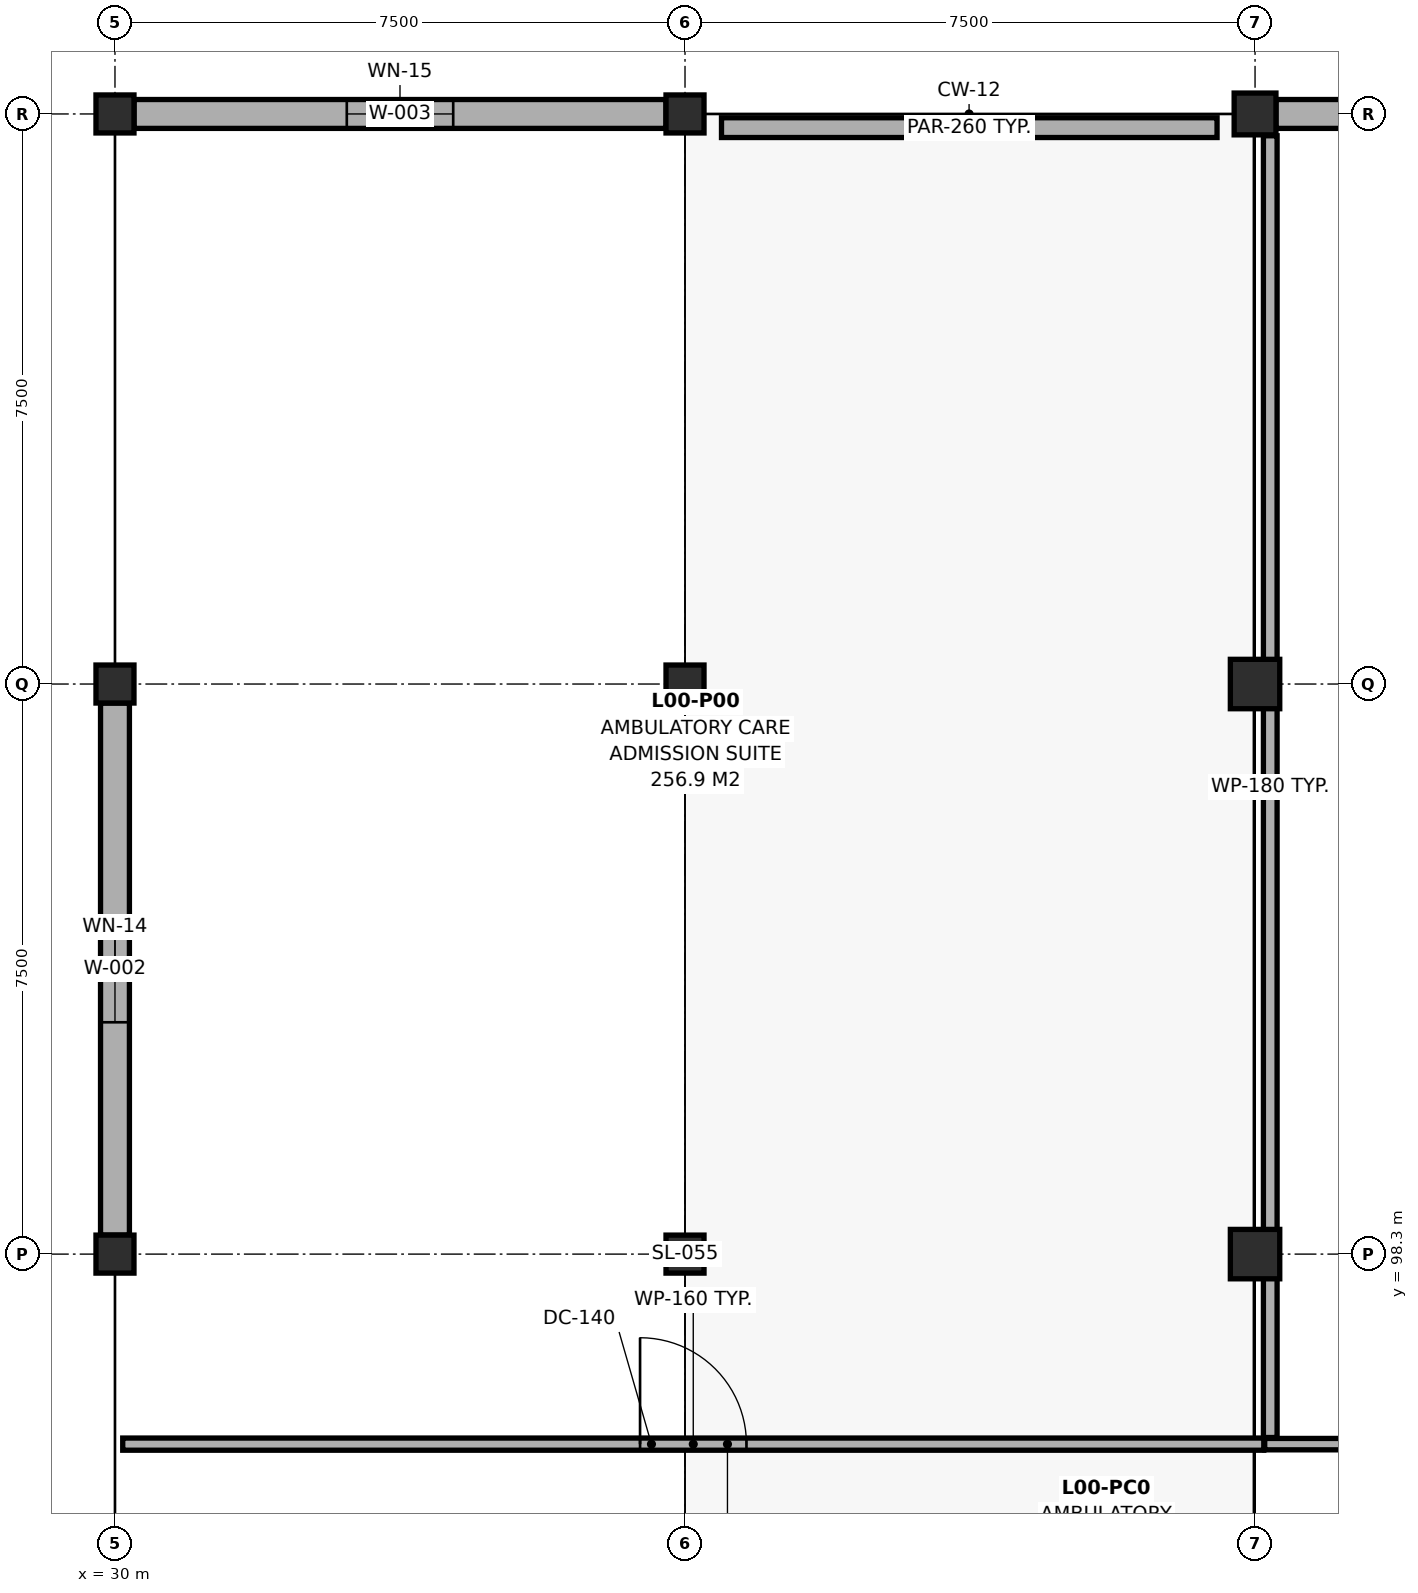
"""IFC4 building model, lengths in metres.
Left out: names, types, materials, properties, quantities, classifications, styles, units other than length and angle.
Written with IfcOpenShell. Run it as: python <this file> out.ifc"""

import sys

from ifc_helpers import new_model, si_unit, direction, frame, frame_2d, origin, origin_2d, place, context, subcontext, project, spatial, rectangle, extrude, element, fill, save


model = new_model("IFC4")
c1 = context("Model", 3, precision=1e-05, world=origin(), true_north=direction((0.0, 1.0)))
c2 = subcontext(c1, "Body", "Model", "MODEL_VIEW")
j1 = project(units=[si_unit("LENGTHUNIT", "METRE"), si_unit("PLANEANGLEUNIT", "RADIAN")], contexts=[c1])
p1 = place(None, origin())
s1 = spatial("IfcSite", under=j1, at=p1, CompositionType="ELEMENT")
p2 = place(p1, origin())
s2 = spatial("IfcBuilding", under=s1, at=p2, CompositionType="ELEMENT")
p3 = place(p2, origin())
s3 = spatial("IfcBuildingStorey", under=s2, at=p3, CompositionType="ELEMENT", Elevation=0.0)
for number, where, z_axis, x_axis in (
    (1, (30.0, 98.3, 0.0), (0.0, 0.0, 1.0), (1.0, 0.0, 0.0)),
    (2, (30.0, 105.8, 0.0), (0.0, 0.0, 1.0), (1.0, 0.0, 0.0)),
    (3, (30.0, 113.3, 0.0), (0.0, 0.0, 1.0), (1.0, 0.0, 0.0)),
):
    element("IfcColumn", number, at=place(p3, frame(where, z_axis=z_axis, x_axis=x_axis)), inside=s3, PredefinedType="COLUMN", context=c2, shape_type="SweptSolid", body=[
        extrude(rectangle(XDim=0.5, YDim=0.5, at=origin_2d()), origin(), (0.0, 0.0, 1.0), 6.136),
    ])
for number, where, z_axis, x_axis in (
    (4, (37.5, 98.3, 0.0), (0.0, 0.0, 1.0), (1.0, 0.0, 0.0)),
    (5, (37.5, 105.8, 0.0), (0.0, 0.0, 1.0), (1.0, 0.0, 0.0)),
    (6, (37.5, 113.3, 0.0), (0.0, 0.0, 1.0), (1.0, 0.0, 0.0)),
):
    element("IfcColumn", number, at=place(p3, frame(where, z_axis=z_axis, x_axis=x_axis)), inside=s3, PredefinedType="COLUMN", context=c2, shape_type="SweptSolid", body=[
        extrude(rectangle(XDim=0.5, YDim=0.5, at=origin_2d()), origin(), (0.0, 0.0, 1.0), 4.7),
    ])
for number, where, z_axis, x_axis in (
    (7, (45.0, 98.3, 0.0), (0.0, 0.0, 1.0), (1.0, 0.0, 0.0)),
    (8, (45.0, 105.8, 0.0), (0.0, 0.0, 1.0), (1.0, 0.0, 0.0)),
):
    element("IfcColumn", number, at=place(p3, frame(where, z_axis=z_axis, x_axis=x_axis)), inside=s3, PredefinedType="COLUMN", context=c2, shape_type="SweptSolid", body=[
        extrude(rectangle(XDim=0.65, YDim=0.65, at=origin_2d()), origin(), (0.0, 0.0, 1.0), 4.7),
    ])
p4 = place(p3, frame((45.0, 113.3, 0.0), z_axis=(0.0, 0.0, 1.0), x_axis=(1.0, 0.0, 0.0)))
e9 = element("IfcColumn", 9, at=p4, inside=s3, PredefinedType="COLUMN", context=c2, shape_type="SweptSolid", body=[
    extrude(rectangle(XDim=0.55, YDim=0.55, at=origin_2d()), origin(), (0.0, 0.0, 1.0), 4.7),
])
p5 = place(p3, frame((30.0, 98.55, 0.0), z_axis=(0.0, 0.0, 1.0), x_axis=(0.0, 1.0, 0.0)))
e10 = element("IfcWall", 10, at=p5, inside=s3, PredefinedType="SOLIDWALL", context=c2, shape_type="SweptSolid", body=[
    extrude(rectangle(XDim=7.0, YDim=0.38, at=frame_2d((3.5, 0.0))), origin(), (0.0, 0.0, 1.0), 4.67),
])
p6 = place(p5, frame((2.8, 0.0, 0.9)))
e11 = element("IfcOpeningElement", 11, at=p6, cuts=e10, PredefinedType="OPENING", context=c2, shape_type="SweptSolid", body=[
    extrude(rectangle(XDim=1.4, YDim=1.5, at=frame_2d((0.7, 0.75))), frame((0.0, 0.202, 0.0), z_axis=(0.0, -1.0, 0.0), x_axis=(1.0, 0.0, 0.0)), (0.0, 0.0, 1.0), 0.404),
])
p7 = place(p3, frame((30.25, 113.3, 0.0), z_axis=(0.0, 0.0, 1.0), x_axis=(1.0, 0.0, 0.0)))
e12 = element("IfcWall", 12, at=p7, inside=s3, PredefinedType="SOLIDWALL", context=c2, shape_type="SweptSolid", body=[
    extrude(rectangle(XDim=7.0, YDim=0.38, at=frame_2d((3.5, 0.0))), origin(), (0.0, 0.0, 1.0), 4.67),
])
p8 = place(p7, frame((2.8, 0.0, 0.9)))
e13 = element("IfcOpeningElement", 13, at=p8, cuts=e12, PredefinedType="OPENING", context=c2, shape_type="SweptSolid", body=[
    extrude(rectangle(XDim=1.4, YDim=1.7, at=frame_2d((0.7, 0.85))), frame((0.0, 0.202, 0.0), z_axis=(0.0, -1.0, 0.0), x_axis=(1.0, 0.0, 0.0)), (0.0, 0.0, 1.0), 0.404),
])
p9 = place(p3, frame((45.275, 113.3, 0.0), z_axis=(0.0, 0.0, 1.0), x_axis=(1.0, 0.0, 0.0)))
e14 = element("IfcWall", 14, at=p9, inside=s3, PredefinedType="SOLIDWALL", context=c2, shape_type="SweptSolid", body=[
    extrude(rectangle(XDim=6.95, YDim=0.38, at=frame_2d((3.475, 0.0))), origin(), (0.0, 0.0, 1.0), 3.985),
])
p10 = place(p3, frame((37.98, 113.12, 4.9), z_axis=(0.0, 0.0, 1.0), x_axis=(1.0, 0.0, 0.0)))
e15 = element("IfcWall", 15, at=p10, inside=s3, PredefinedType="PARAPET", context=c2, shape_type="SweptSolid", body=[
    extrude(rectangle(XDim=6.52, YDim=0.26, at=frame_2d((3.26, 0.0))), origin(), (0.0, 0.0, 1.0), 0.6),
])
p11 = place(p3, frame((30.102, 95.8, 0.0), z_axis=(0.0, 0.0, 1.0), x_axis=(1.0, 0.0, 0.0)))
e16 = element("IfcWall", 16, at=p11, inside=s3, PredefinedType="PARTITIONING", context=c2, shape_type="SweptSolid", body=[
    extrude(rectangle(XDim=15.013, YDim=0.16, at=frame_2d((7.506, 0.0))), origin(), (0.0, 0.0, 1.0), 4.035),
])
p12 = place(p11, frame((6.806, 0.0, 0.0)))
e17 = element("IfcOpeningElement", 17, at=p12, cuts=e16, PredefinedType="OPENING", context=c2, shape_type="SweptSolid", body=[
    extrude(rectangle(XDim=1.4, YDim=2.25, at=frame_2d((0.7, 1.125))), frame((0.0, 0.092, 0.0), z_axis=(0.0, -1.0, 0.0), x_axis=(1.0, 0.0, 0.0)), (0.0, 0.0, 1.0), 0.184),
])
p13 = place(p3, frame((45.127, 95.8, 0.0), z_axis=(0.0, 0.0, 1.0), x_axis=(1.0, 0.0, 0.0)))
e18 = element("IfcWall", 18, at=p13, inside=s3, PredefinedType="PARTITIONING", context=c2, shape_type="SweptSolid", body=[
    extrude(rectangle(XDim=12.788, YDim=0.15, at=frame_2d((6.394, 0.0))), origin(), (0.0, 0.0, 1.0), 3.985),
])
p14 = place(p13, frame((5.669, 0.0, 0.0)))
e19 = element("IfcOpeningElement", 19, at=p14, cuts=e18, PredefinedType="OPENING", context=c2, shape_type="SweptSolid", body=[
    extrude(rectangle(XDim=1.45, YDim=2.26, at=frame_2d((0.725, 1.13))), frame((0.0, 0.087, 0.0), z_axis=(0.0, -1.0, 0.0), x_axis=(1.0, 0.0, 0.0)), (0.0, 0.0, 1.0), 0.174),
])
p15 = place(p3, frame((45.2, 95.887, 0.0), z_axis=(0.0, 0.0, 1.0), x_axis=(0.0, 1.0, 0.0)))
e20 = element("IfcWall", 20, at=p15, inside=s3, PredefinedType="PARTITIONING", context=c2, shape_type="SweptSolid", body=[
    extrude(rectangle(XDim=17.126, YDim=0.18, at=frame_2d((8.563, 0.0))), origin(), (0.0, 0.0, 1.0), 3.985),
])
p16 = place(p6, origin())
e21 = element("IfcWindow", 21, at=p16, inside=s3, PartitioningType="SINGLE_PANEL", PredefinedType="WINDOW", context=c2, shape_type="SweptSolid", body=[
    extrude(rectangle(XDim=1.4, YDim=1.5, at=frame_2d((0.7, 0.75))), frame((0.0, 0.03, 0.0), z_axis=(0.0, -1.0, 0.0), x_axis=(1.0, 0.0, 0.0)), (0.0, 0.0, 1.0), 0.06),
])
fill(e11, e21)
p17 = place(p8, origin())
e22 = element("IfcWindow", 22, at=p17, inside=s3, PartitioningType="SINGLE_PANEL", PredefinedType="WINDOW", context=c2, shape_type="SweptSolid", body=[
    extrude(rectangle(XDim=1.4, YDim=1.7, at=frame_2d((0.7, 0.85))), frame((0.0, 0.03, 0.0), z_axis=(0.0, -1.0, 0.0), x_axis=(1.0, 0.0, 0.0)), (0.0, 0.0, 1.0), 0.06),
])
fill(e13, e22)
p18 = place(p12, origin())
e23 = element("IfcDoor", 23, at=p18, inside=s3, OperationType="SINGLE_SWING_LEFT", PredefinedType="DOOR", context=c2, shape_type="SweptSolid", body=[
    extrude(rectangle(XDim=1.4, YDim=2.25, at=frame_2d((0.7, 1.125))), frame((0.0, 0.025, 0.0), z_axis=(0.0, -1.0, 0.0), x_axis=(1.0, 0.0, 0.0)), (0.0, 0.0, 1.0), 0.05),
])
fill(e17, e23)
save(model, sys.argv[1])
